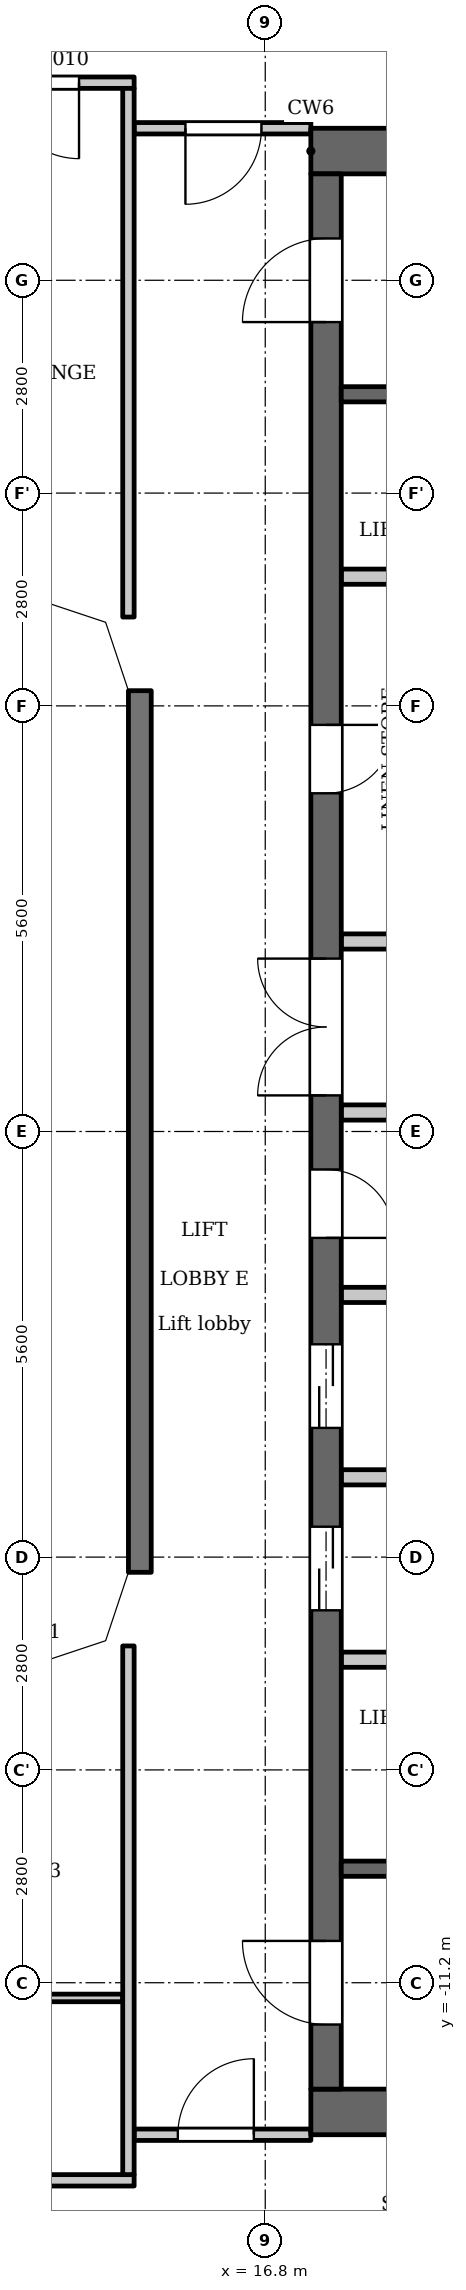
"""IFC4 building model, lengths in metres.
Left out: names, types, materials, properties, quantities, classifications, styles, units other than length and angle.
Written with IfcOpenShell. Run it as: python <this file> out.ifc"""

import sys

from ifc_helpers import new_model, si_unit, direction, frame, frame_2d, origin, place, context, subcontext, project, spatial, polyline, rectangle, outline, extrude, element, fill, save


model = new_model("IFC4")
c1 = context("Model", 3, precision=1e-05, world=origin(), true_north=direction((0.0, 1.0)))
c2 = subcontext(c1, "Body", "Model", "MODEL_VIEW")
j1 = project(units=[si_unit("LENGTHUNIT", "METRE"), si_unit("PLANEANGLEUNIT", "RADIAN")], contexts=[c1])
p1 = place(None, origin())
s1 = spatial("IfcSite", under=j1, at=p1, CompositionType="ELEMENT")
p2 = place(p1, origin())
s2 = spatial("IfcBuilding", under=s1, at=p2, CompositionType="ELEMENT")
p3 = place(p2, frame((0.0, 0.0, 266.2)))
s3 = spatial("IfcBuildingStorey", under=s2, at=p3, CompositionType="ELEMENT", Elevation=266.2)
p4 = place(p3, frame((15.15, 5.8, 0.0), z_axis=(0.0, 0.0, 1.0), x_axis=(0.0, -1.0, 0.0)))
e1 = element("IfcWall", 1, at=p4, inside=s3, PredefinedType="SOLIDWALL", context=c2, shape_type="SweptSolid", body=[
    extrude(rectangle(XDim=11.6, YDim=0.3, at=frame_2d((5.8, 0.0))), origin(), (0.0, 0.0, 1.0), 3.2),
])
for number, where, z_axis, x_axis in (
    (2, (17.4, 12.9, 0.0), (0.0, 0.0, 1.0), (1.0, 0.0, 0.0)),
    (3, (17.4, -12.9, 0.0), (0.0, 0.0, 1.0), (1.0, 0.0, 0.0)),
):
    element("IfcWall", number, at=place(p3, frame(where, z_axis=z_axis, x_axis=x_axis)), inside=s3, PredefinedType="SHEAR", context=c2, shape_type="SweptSolid", body=[
        extrude(rectangle(XDim=7.32, YDim=0.6, at=frame_2d((3.66, 0.0))), origin(), (0.0, 0.0, 1.0), 3.2),
    ])
p5 = place(p3, frame((17.6, -12.6, 0.0), z_axis=(0.0, 0.0, 1.0), x_axis=(0.0, 1.0, 0.0)))
e4 = element("IfcWall", 4, at=p5, inside=s3, PredefinedType="SHEAR", context=c2, shape_type="SweptSolid", body=[
    extrude(rectangle(XDim=25.2, YDim=0.4, at=frame_2d((12.6, 0.0))), origin(), (0.0, 0.0, 1.0), 3.2),
])
p6 = place(p5, frame((6.3, 0.0, 0.0)))
e5 = element("IfcOpeningElement", 5, at=p6, cuts=e4, PredefinedType="OPENING", context=c2, shape_type="SweptSolid", body=[
    extrude(rectangle(XDim=1.1, YDim=2.1, at=frame_2d((0.55, 1.05))), frame((0.0, 0.21, 0.0), z_axis=(0.0, -1.0, 0.0), x_axis=(1.0, 0.0, 0.0)), (0.0, 0.0, 1.0), 0.42),
])
p7 = place(p5, frame((8.7, 0.0, 0.0)))
e6 = element("IfcOpeningElement", 6, at=p7, cuts=e4, PredefinedType="OPENING", context=c2, shape_type="SweptSolid", body=[
    extrude(rectangle(XDim=1.1, YDim=2.1, at=frame_2d((0.55, 1.05))), frame((0.0, 0.21, 0.0), z_axis=(0.0, -1.0, 0.0), x_axis=(1.0, 0.0, 0.0)), (0.0, 0.0, 1.0), 0.42),
])
p8 = place(p5, frame((11.2, 0.0, 0.0)))
e7 = element("IfcOpeningElement", 7, at=p8, cuts=e4, PredefinedType="OPENING", context=c2, shape_type="SweptSolid", body=[
    extrude(rectangle(XDim=0.9, YDim=2.1, at=frame_2d((0.45, 1.05))), frame((0.0, 0.21, 0.0), z_axis=(0.0, -1.0, 0.0), x_axis=(1.0, 0.0, 0.0)), (0.0, 0.0, 1.0), 0.42),
])
p9 = place(p5, frame((17.05, 0.0, 0.0)))
e8 = element("IfcOpeningElement", 8, at=p9, cuts=e4, PredefinedType="OPENING", context=c2, shape_type="SweptSolid", body=[
    extrude(rectangle(XDim=0.9, YDim=2.1, at=frame_2d((0.45, 1.05))), frame((0.0, 0.21, 0.0), z_axis=(0.0, -1.0, 0.0), x_axis=(1.0, 0.0, 0.0)), (0.0, 0.0, 1.0), 0.42),
])
p10 = place(p5, frame((23.25, 0.0, 0.0)))
e9 = element("IfcOpeningElement", 9, at=p10, cuts=e4, PredefinedType="OPENING", context=c2, shape_type="SweptSolid", body=[
    extrude(rectangle(XDim=1.1, YDim=2.1, at=frame_2d((0.55, 1.05))), frame((0.0, 0.21, 0.0), z_axis=(0.0, -1.0, 0.0), x_axis=(1.0, 0.0, 0.0)), (0.0, 0.0, 1.0), 0.42),
])
p11 = place(p5, frame((0.85, 0.0, 0.0)))
e10 = element("IfcOpeningElement", 10, at=p11, cuts=e4, PredefinedType="OPENING", context=c2, shape_type="SweptSolid", body=[
    extrude(rectangle(XDim=1.1, YDim=2.1, at=frame_2d((0.55, 1.05))), frame((0.0, 0.21, 0.0), z_axis=(0.0, -1.0, 0.0), x_axis=(1.0, 0.0, 0.0)), (0.0, 0.0, 1.0), 0.42),
])
p12 = place(p5, frame((13.075, 0.0, 0.0)))
e11 = element("IfcOpeningElement", 11, at=p12, cuts=e4, PredefinedType="OPENING", context=c2, shape_type="SweptSolid", body=[
    extrude(rectangle(XDim=1.8, YDim=2.1, at=frame_2d((0.9, 1.05))), frame((0.0, 0.21, 0.0), z_axis=(0.0, -1.0, 0.0), x_axis=(1.0, 0.0, 0.0)), (0.0, 0.0, 1.0), 0.42),
])
p13 = place(p3, frame((17.8, -9.7, 0.0), z_axis=(0.0, 0.0, 1.0), x_axis=(1.0, 0.0, 0.0)))
e12 = element("IfcWall", 12, at=p13, inside=s3, PredefinedType="SHEAR", context=c2, shape_type="SweptSolid", body=[
    extrude(rectangle(XDim=5.8, YDim=0.2, at=frame_2d((2.9, 0.0))), origin(), (0.0, 0.0, 1.0), 3.2),
])
p14 = place(p13, frame((0.85, 0.0, 0.0)))
e13 = element("IfcOpeningElement", 13, at=p14, cuts=e12, PredefinedType="OPENING", context=c2, shape_type="SweptSolid", body=[
    extrude(rectangle(XDim=1.1, YDim=2.1, at=frame_2d((0.55, 1.05))), frame((0.0, 0.11, 0.0), z_axis=(0.0, -1.0, 0.0), x_axis=(1.0, 0.0, 0.0)), (0.0, 0.0, 1.0), 0.22),
])
p15 = place(p13, frame((3.75, 0.0, 0.0)))
e14 = element("IfcOpeningElement", 14, at=p15, cuts=e12, PredefinedType="OPENING", context=c2, shape_type="SweptSolid", body=[
    extrude(rectangle(XDim=1.1, YDim=2.1, at=frame_2d((0.55, 1.05))), frame((0.0, 0.11, 0.0), z_axis=(0.0, -1.0, 0.0), x_axis=(1.0, 0.0, 0.0)), (0.0, 0.0, 1.0), 0.22),
])
for number, where, z_axis, x_axis in (
    (15, (17.8, -6.95, 0.0), (0.0, 0.0, 1.0), (1.0, 0.0, 0.0)),
    (16, (17.8, -4.55, 0.0), (0.0, 0.0, 1.0), (1.0, 0.0, 0.0)),
    (17, (17.8, -2.15, 0.0), (0.0, 0.0, 1.0), (1.0, 0.0, 0.0)),
):
    element("IfcWall", number, at=place(p3, frame(where, z_axis=z_axis, x_axis=x_axis)), inside=s3, PredefinedType="PARTITIONING", context=c2, shape_type="SweptSolid", body=[
        extrude(rectangle(XDim=2.8, YDim=0.2, at=frame_2d((1.4, 0.0))), origin(), (0.0, 0.0, 1.0), 3.2),
    ])
p16 = place(p3, frame((17.8, 0.25, 0.0), z_axis=(0.0, 0.0, 1.0), x_axis=(1.0, 0.0, 0.0)))
e18 = element("IfcWall", 18, at=p16, inside=s3, PredefinedType="PARTITIONING", context=c2, shape_type="SweptSolid", body=[
    extrude(rectangle(XDim=3.0, YDim=0.2, at=frame_2d((1.5, 0.0))), origin(), (0.0, 0.0, 1.0), 3.2),
])
p17 = place(p3, frame((17.8, 2.5, 0.0), z_axis=(0.0, 0.0, 1.0), x_axis=(1.0, 0.0, 0.0)))
e19 = element("IfcWall", 19, at=p17, inside=s3, PredefinedType="PARTITIONING", context=c2, shape_type="SweptSolid", body=[
    extrude(rectangle(XDim=3.0, YDim=0.2, at=frame_2d((1.5, 0.0))), origin(), (0.0, 0.0, 1.0), 3.2),
])
p18 = place(p17, frame((1.7, 0.0, 0.0)))
e20 = element("IfcOpeningElement", 20, at=p18, cuts=e19, PredefinedType="OPENING", context=c2, shape_type="SweptSolid", body=[
    extrude(rectangle(XDim=0.9, YDim=2.1, at=frame_2d((0.45, 1.05))), frame((0.0, 0.11, 0.0), z_axis=(0.0, -1.0, 0.0), x_axis=(1.0, 0.0, 0.0)), (0.0, 0.0, 1.0), 0.22),
])
p19 = place(p3, frame((17.8, 7.3, 0.0), z_axis=(0.0, 0.0, 1.0), x_axis=(1.0, 0.0, 0.0)))
e21 = element("IfcWall", 21, at=p19, inside=s3, PredefinedType="PARTITIONING", context=c2, shape_type="SweptSolid", body=[
    extrude(rectangle(XDim=2.8, YDim=0.2, at=frame_2d((1.4, 0.0))), origin(), (0.0, 0.0, 1.0), 3.2),
])
p20 = place(p3, frame((17.8, 9.7, 0.0), z_axis=(0.0, 0.0, 1.0), x_axis=(1.0, 0.0, 0.0)))
e22 = element("IfcWall", 22, at=p20, inside=s3, PredefinedType="SHEAR", context=c2, shape_type="SweptSolid", body=[
    extrude(rectangle(XDim=5.8, YDim=0.2, at=frame_2d((2.9, 0.0))), origin(), (0.0, 0.0, 1.0), 3.2),
])
p21 = place(p20, frame((0.85, 0.0, 0.0)))
e23 = element("IfcOpeningElement", 23, at=p21, cuts=e22, PredefinedType="OPENING", context=c2, shape_type="SweptSolid", body=[
    extrude(rectangle(XDim=1.1, YDim=2.1, at=frame_2d((0.55, 1.05))), frame((0.0, 0.11, 0.0), z_axis=(0.0, -1.0, 0.0), x_axis=(1.0, 0.0, 0.0)), (0.0, 0.0, 1.0), 0.22),
])
p22 = place(p20, frame((3.75, 0.0, 0.0)))
e24 = element("IfcOpeningElement", 24, at=p22, cuts=e22, PredefinedType="OPENING", context=c2, shape_type="SweptSolid", body=[
    extrude(rectangle(XDim=1.1, YDim=2.1, at=frame_2d((0.55, 1.05))), frame((0.0, 0.11, 0.0), z_axis=(0.0, -1.0, 0.0), x_axis=(1.0, 0.0, 0.0)), (0.0, 0.0, 1.0), 0.22),
])
p23 = place(p3, frame((-15.075, -13.8, 0.0), z_axis=(0.0, 0.0, 1.0), x_axis=(1.0, 0.0, 0.0)))
e25 = element("IfcWall", 25, at=p23, inside=s3, PredefinedType="PARTITIONING", context=c2, shape_type="SweptSolid", body=[
    extrude(rectangle(XDim=30.15, YDim=0.15, at=frame_2d((15.075, 0.0))), origin(), (0.0, 0.0, 1.0), 3.2),
])
p24 = place(p23, frame((2.225, 0.0, 0.0)))
e26 = element("IfcOpeningElement", 26, at=p24, cuts=e25, PredefinedType="OPENING", context=c2, shape_type="SweptSolid", body=[
    extrude(rectangle(XDim=1.0, YDim=2.1, at=frame_2d((0.5, 1.05))), frame((0.0, 0.085, 0.0), z_axis=(0.0, -1.0, 0.0), x_axis=(1.0, 0.0, 0.0)), (0.0, 0.0, 1.0), 0.17),
])
p25 = place(p23, frame((10.825, 0.0, 0.0)))
e27 = element("IfcOpeningElement", 27, at=p25, cuts=e25, PredefinedType="OPENING", context=c2, shape_type="SweptSolid", body=[
    extrude(rectangle(XDim=1.0, YDim=2.1, at=frame_2d((0.5, 1.05))), frame((0.0, 0.085, 0.0), z_axis=(0.0, -1.0, 0.0), x_axis=(1.0, 0.0, 0.0)), (0.0, 0.0, 1.0), 0.17),
])
p26 = place(p23, frame((15.775, 0.0, 0.0)))
e28 = element("IfcOpeningElement", 28, at=p26, cuts=e25, PredefinedType="OPENING", context=c2, shape_type="SweptSolid", body=[
    extrude(rectangle(XDim=1.0, YDim=2.1, at=frame_2d((0.5, 1.05))), frame((0.0, 0.085, 0.0), z_axis=(0.0, -1.0, 0.0), x_axis=(1.0, 0.0, 0.0)), (0.0, 0.0, 1.0), 0.17),
])
p27 = place(p3, frame((15.075, -13.2, 0.0), z_axis=(0.0, 0.0, 1.0), x_axis=(1.0, 0.0, 0.0)))
e29 = element("IfcWall", 29, at=p27, inside=s3, PredefinedType="PARTITIONING", context=c2, shape_type="SweptSolid", body=[
    extrude(rectangle(XDim=2.325, YDim=0.15, at=frame_2d((1.163, 0.0))), origin(), (0.0, 0.0, 1.0), 3.2),
])
p28 = place(p27, frame((0.575, 0.0, 0.0)))
e30 = element("IfcOpeningElement", 30, at=p28, cuts=e29, PredefinedType="OPENING", context=c2, shape_type="SweptSolid", body=[
    extrude(rectangle(XDim=1.0, YDim=2.1, at=frame_2d((0.5, 1.05))), frame((0.0, 0.085, 0.0), z_axis=(0.0, -1.0, 0.0), x_axis=(1.0, 0.0, 0.0)), (0.0, 0.0, 1.0), 0.17),
])
p29 = place(p3, frame((-14.925, -11.4, 0.0), z_axis=(0.0, 0.0, 1.0), x_axis=(1.0, 0.0, 0.0)))
e31 = element("IfcWall", 31, at=p29, inside=s3, PredefinedType="PARTITIONING", context=c2, shape_type="SweptSolid", body=[
    extrude(rectangle(XDim=29.85, YDim=0.1, at=frame_2d((14.925, 0.0))), origin(), (0.0, 0.0, 1.0), 3.2),
])
p30 = place(p29, frame((7.875, 0.0, 0.0)))
e32 = element("IfcOpeningElement", 32, at=p30, cuts=e31, PredefinedType="OPENING", context=c2, shape_type="SweptSolid", body=[
    extrude(rectangle(XDim=0.8, YDim=2.1, at=frame_2d((0.4, 1.05))), frame((0.0, 0.06, 0.0), z_axis=(0.0, -1.0, 0.0), x_axis=(1.0, 0.0, 0.0)), (0.0, 0.0, 1.0), 0.12),
])
p31 = place(p29, frame((1.175, 0.0, 0.0)))
e33 = element("IfcOpeningElement", 33, at=p31, cuts=e31, PredefinedType="OPENING", context=c2, shape_type="SweptSolid", body=[
    extrude(rectangle(XDim=0.9, YDim=2.1, at=frame_2d((0.45, 1.05))), frame((0.0, 0.06, 0.0), z_axis=(0.0, -1.0, 0.0), x_axis=(1.0, 0.0, 0.0)), (0.0, 0.0, 1.0), 0.12),
])
p32 = place(p29, frame((13.475, 0.0, 0.0)))
e34 = element("IfcOpeningElement", 34, at=p32, cuts=e31, PredefinedType="OPENING", context=c2, shape_type="SweptSolid", body=[
    extrude(rectangle(XDim=0.8, YDim=2.1, at=frame_2d((0.4, 1.05))), frame((0.0, 0.06, 0.0), z_axis=(0.0, -1.0, 0.0), x_axis=(1.0, 0.0, 0.0)), (0.0, 0.0, 1.0), 0.12),
])
p33 = place(p29, frame((9.775, 0.0, 0.0)))
e35 = element("IfcOpeningElement", 35, at=p33, cuts=e31, PredefinedType="OPENING", context=c2, shape_type="SweptSolid", body=[
    extrude(rectangle(XDim=0.9, YDim=2.1, at=frame_2d((0.45, 1.05))), frame((0.0, 0.06, 0.0), z_axis=(0.0, -1.0, 0.0), x_axis=(1.0, 0.0, 0.0)), (0.0, 0.0, 1.0), 0.12),
])
p34 = place(p29, frame((16.675, 0.0, 0.0)))
e36 = element("IfcOpeningElement", 36, at=p34, cuts=e31, PredefinedType="OPENING", context=c2, shape_type="SweptSolid", body=[
    extrude(rectangle(XDim=0.9, YDim=2.1, at=frame_2d((0.45, 1.05))), frame((0.0, 0.06, 0.0), z_axis=(0.0, -1.0, 0.0), x_axis=(1.0, 0.0, 0.0)), (0.0, 0.0, 1.0), 0.12),
])
p35 = place(p29, frame((18.225, 0.0, 0.0)))
e37 = element("IfcOpeningElement", 37, at=p35, cuts=e31, PredefinedType="OPENING", context=c2, shape_type="SweptSolid", body=[
    extrude(rectangle(XDim=0.9, YDim=2.1, at=frame_2d((0.45, 1.05))), frame((0.0, 0.06, 0.0), z_axis=(0.0, -1.0, 0.0), x_axis=(1.0, 0.0, 0.0)), (0.0, 0.0, 1.0), 0.12),
])
p36 = place(p29, frame((24.325, 0.0, 0.0)))
e38 = element("IfcOpeningElement", 38, at=p36, cuts=e31, PredefinedType="OPENING", context=c2, shape_type="SweptSolid", body=[
    extrude(rectangle(XDim=0.9, YDim=2.1, at=frame_2d((0.45, 1.05))), frame((0.0, 0.06, 0.0), z_axis=(0.0, -1.0, 0.0), x_axis=(1.0, 0.0, 0.0)), (0.0, 0.0, 1.0), 0.12),
])
p37 = place(p3, frame((15.075, 13.2, 0.0), z_axis=(0.0, 0.0, 1.0), x_axis=(1.0, 0.0, 0.0)))
e39 = element("IfcWall", 39, at=p37, inside=s3, PredefinedType="PARTITIONING", context=c2, shape_type="SweptSolid", body=[
    extrude(rectangle(XDim=2.325, YDim=0.15, at=frame_2d((1.163, 0.0))), origin(), (0.0, 0.0, 1.0), 3.2),
])
p38 = place(p37, frame((0.675, 0.0, 0.0)))
e40 = element("IfcOpeningElement", 40, at=p38, cuts=e39, PredefinedType="OPENING", context=c2, shape_type="SweptSolid", body=[
    extrude(rectangle(XDim=1.0, YDim=2.1, at=frame_2d((0.5, 1.05))), frame((0.0, 0.085, 0.0), z_axis=(0.0, -1.0, 0.0), x_axis=(1.0, 0.0, 0.0)), (0.0, 0.0, 1.0), 0.17),
])
p39 = place(p3, frame((-15.075, 13.8, 0.0), z_axis=(0.0, 0.0, 1.0), x_axis=(1.0, 0.0, 0.0)))
e41 = element("IfcWall", 41, at=p39, inside=s3, PredefinedType="PARTITIONING", context=c2, shape_type="SweptSolid", body=[
    extrude(rectangle(XDim=30.15, YDim=0.15, at=frame_2d((15.075, 0.0))), origin(), (0.0, 0.0, 1.0), 3.2),
])
p40 = place(p39, frame((0.726, 0.0, 0.0)))
e42 = element("IfcOpeningElement", 42, at=p40, cuts=e41, PredefinedType="OPENING", context=c2, shape_type="SweptSolid", body=[
    extrude(rectangle(XDim=1.0, YDim=2.1, at=frame_2d((0.5, 1.05))), frame((0.0, 0.085, 0.0), z_axis=(0.0, -1.0, 0.0), x_axis=(1.0, 0.0, 0.0)), (0.0, 0.0, 1.0), 0.17),
])
p41 = place(p39, frame((7.775, 0.0, 0.0)))
e43 = element("IfcOpeningElement", 43, at=p41, cuts=e41, PredefinedType="OPENING", context=c2, shape_type="SweptSolid", body=[
    extrude(rectangle(XDim=1.0, YDim=2.1, at=frame_2d((0.5, 1.05))), frame((0.0, 0.085, 0.0), z_axis=(0.0, -1.0, 0.0), x_axis=(1.0, 0.0, 0.0)), (0.0, 0.0, 1.0), 0.17),
])
p42 = place(p39, frame((10.125, 0.0, 0.0)))
e44 = element("IfcOpeningElement", 44, at=p42, cuts=e41, PredefinedType="OPENING", context=c2, shape_type="SweptSolid", body=[
    extrude(rectangle(XDim=1.0, YDim=2.1, at=frame_2d((0.5, 1.05))), frame((0.0, 0.085, 0.0), z_axis=(0.0, -1.0, 0.0), x_axis=(1.0, 0.0, 0.0)), (0.0, 0.0, 1.0), 0.17),
])
p43 = place(p39, frame((18.975, 0.0, 0.0)))
e45 = element("IfcOpeningElement", 45, at=p43, cuts=e41, PredefinedType="OPENING", context=c2, shape_type="SweptSolid", body=[
    extrude(rectangle(XDim=1.0, YDim=2.1, at=frame_2d((0.5, 1.05))), frame((0.0, 0.085, 0.0), z_axis=(0.0, -1.0, 0.0), x_axis=(1.0, 0.0, 0.0)), (0.0, 0.0, 1.0), 0.17),
])
p44 = place(p39, frame((21.325, 0.0, 0.0)))
e46 = element("IfcOpeningElement", 46, at=p44, cuts=e41, PredefinedType="OPENING", context=c2, shape_type="SweptSolid", body=[
    extrude(rectangle(XDim=1.0, YDim=2.1, at=frame_2d((0.5, 1.05))), frame((0.0, 0.085, 0.0), z_axis=(0.0, -1.0, 0.0), x_axis=(1.0, 0.0, 0.0)), (0.0, 0.0, 1.0), 0.17),
])
p45 = place(p39, frame((28.425, 0.0, 0.0)))
e47 = element("IfcOpeningElement", 47, at=p45, cuts=e41, PredefinedType="OPENING", context=c2, shape_type="SweptSolid", body=[
    extrude(rectangle(XDim=1.0, YDim=2.1, at=frame_2d((0.5, 1.05))), frame((0.0, 0.085, 0.0), z_axis=(0.0, -1.0, 0.0), x_axis=(1.0, 0.0, 0.0)), (0.0, 0.0, 1.0), 0.17),
])
for number, where, z_axis, x_axis in (
    (48, (15.0, -13.725, 0.0), (0.0, 0.0, 1.0), (0.0, 1.0, 0.0)),
    (49, (15.0, 6.769, 0.0), (0.0, 0.0, 1.0), (0.0, 1.0, 0.0)),
):
    element("IfcWall", number, at=place(p3, frame(where, z_axis=z_axis, x_axis=x_axis)), inside=s3, PredefinedType="PARTITIONING", context=c2, shape_type="SweptSolid", body=[
        extrude(rectangle(XDim=6.956, YDim=0.15, at=frame_2d((3.478, 0.0))), origin(), (0.0, 0.0, 1.0), 3.2),
    ])
p46 = place(p3, origin())
e50 = element("IfcWall", 50, at=p46, inside=s3, PredefinedType="SOLIDWALL", context=c2, shape_type="SweptSolid", body=[
    extrude(outline(polyline([(14.937, 6.937), (13.849, 7.3), (13.8, 7.3), (13.8, 7.0), (14.7, 6.7), (15.0, 5.8), (15.3, 5.8), (15.3, 5.849), (14.937, 6.937)])), origin(), (0.0, 0.0, 1.0), 3.2),
])
e51 = element("IfcWall", 51, at=p46, inside=s3, PredefinedType="SOLIDWALL", context=c2, shape_type="SweptSolid", body=[
    extrude(outline(polyline([(14.937, -6.937), (15.3, -5.849), (15.3, -5.8), (15.0, -5.8), (14.7, -6.7), (13.8, -7.0), (13.8, -7.3), (13.849, -7.3), (14.937, -6.937)])), origin(), (0.0, 0.0, 1.0), 3.2),
])
p47 = place(p6, origin())
e52 = element("IfcDoor", 52, at=p47, inside=s3, OperationType="DOUBLE_DOOR_SLIDING", PredefinedType="DOOR", context=c2, shape_type="SweptSolid", body=[
    extrude(rectangle(XDim=1.1, YDim=2.1, at=frame_2d((0.55, 1.05))), frame((0.0, 0.025, 0.0), z_axis=(0.0, -1.0, 0.0), x_axis=(1.0, 0.0, 0.0)), (0.0, 0.0, 1.0), 0.05),
])
fill(e5, e52)
p48 = place(p7, origin())
e53 = element("IfcDoor", 53, at=p48, inside=s3, OperationType="DOUBLE_DOOR_SLIDING", PredefinedType="DOOR", context=c2, shape_type="SweptSolid", body=[
    extrude(rectangle(XDim=1.1, YDim=2.1, at=frame_2d((0.55, 1.05))), frame((0.0, 0.025, 0.0), z_axis=(0.0, -1.0, 0.0), x_axis=(1.0, 0.0, 0.0)), (0.0, 0.0, 1.0), 0.05),
])
fill(e6, e53)
p49 = place(p8, origin())
e54 = element("IfcDoor", 54, at=p49, inside=s3, OperationType="SINGLE_SWING_LEFT", PredefinedType="DOOR", context=c2, shape_type="SweptSolid", body=[
    extrude(rectangle(XDim=0.9, YDim=2.1, at=frame_2d((0.45, 1.05))), frame((0.0, 0.025, 0.0), z_axis=(0.0, -1.0, 0.0), x_axis=(1.0, 0.0, 0.0)), (0.0, 0.0, 1.0), 0.05),
])
fill(e7, e54)
p50 = place(p9, origin())
e55 = element("IfcDoor", 55, at=p50, inside=s3, OperationType="SINGLE_SWING_RIGHT", PredefinedType="DOOR", context=c2, shape_type="SweptSolid", body=[
    extrude(rectangle(XDim=0.9, YDim=2.1, at=frame_2d((0.45, 1.05))), frame((0.0, 0.025, 0.0), z_axis=(0.0, -1.0, 0.0), x_axis=(1.0, 0.0, 0.0)), (0.0, 0.0, 1.0), 0.05),
])
fill(e8, e55)
p51 = place(p10, origin())
e56 = element("IfcDoor", 56, at=p51, inside=s3, OperationType="SINGLE_SWING_RIGHT", PredefinedType="DOOR", context=c2, shape_type="SweptSolid", body=[
    extrude(rectangle(XDim=1.1, YDim=2.1, at=frame_2d((0.55, 1.05))), frame((0.0, 0.025, 0.0), z_axis=(0.0, -1.0, 0.0), x_axis=(1.0, 0.0, 0.0)), (0.0, 0.0, 1.0), 0.05),
])
fill(e9, e56)
p52 = place(p11, origin())
e57 = element("IfcDoor", 57, at=p52, inside=s3, OperationType="SINGLE_SWING_LEFT", PredefinedType="DOOR", context=c2, shape_type="SweptSolid", body=[
    extrude(rectangle(XDim=1.1, YDim=2.1, at=frame_2d((0.55, 1.05))), frame((0.0, 0.025, 0.0), z_axis=(0.0, -1.0, 0.0), x_axis=(1.0, 0.0, 0.0)), (0.0, 0.0, 1.0), 0.05),
])
fill(e10, e57)
p53 = place(p12, origin())
e58 = element("IfcDoor", 58, at=p53, inside=s3, OperationType="DOUBLE_DOOR_SINGLE_SWING", PredefinedType="DOOR", context=c2, shape_type="SweptSolid", body=[
    extrude(rectangle(XDim=1.8, YDim=2.1, at=frame_2d((0.9, 1.05))), frame((0.0, 0.025, 0.0), z_axis=(0.0, -1.0, 0.0), x_axis=(1.0, 0.0, 0.0)), (0.0, 0.0, 1.0), 0.05),
])
fill(e11, e58)
p54 = place(p38, origin())
e59 = element("IfcDoor", 59, at=p54, inside=s3, OperationType="SINGLE_SWING_LEFT", PredefinedType="DOOR", context=c2, shape_type="SweptSolid", body=[
    extrude(rectangle(XDim=1.0, YDim=2.1, at=frame_2d((0.5, 1.05))), frame((0.0, 0.025, 0.0), z_axis=(0.0, -1.0, 0.0), x_axis=(1.0, 0.0, 0.0)), (0.0, 0.0, 1.0), 0.05),
])
fill(e40, e59)
p55 = place(p28, origin())
e60 = element("IfcDoor", 60, at=p55, inside=s3, OperationType="SINGLE_SWING_LEFT", PredefinedType="DOOR", context=c2, shape_type="SweptSolid", body=[
    extrude(rectangle(XDim=1.0, YDim=2.1, at=frame_2d((0.5, 1.05))), frame((0.0, 0.025, 0.0), z_axis=(0.0, -1.0, 0.0), x_axis=(1.0, 0.0, 0.0)), (0.0, 0.0, 1.0), 0.05),
])
fill(e30, e60)
p56 = place(p45, origin())
e61 = element("IfcDoor", 61, at=p56, inside=s3, OperationType="SINGLE_SWING_RIGHT", PredefinedType="DOOR", context=c2, shape_type="SweptSolid", body=[
    extrude(rectangle(XDim=1.0, YDim=2.1, at=frame_2d((0.5, 1.05))), frame((0.0, 0.025, 0.0), z_axis=(0.0, -1.0, 0.0), x_axis=(1.0, 0.0, 0.0)), (0.0, 0.0, 1.0), 0.05),
])
fill(e47, e61)
save(model, sys.argv[1])
